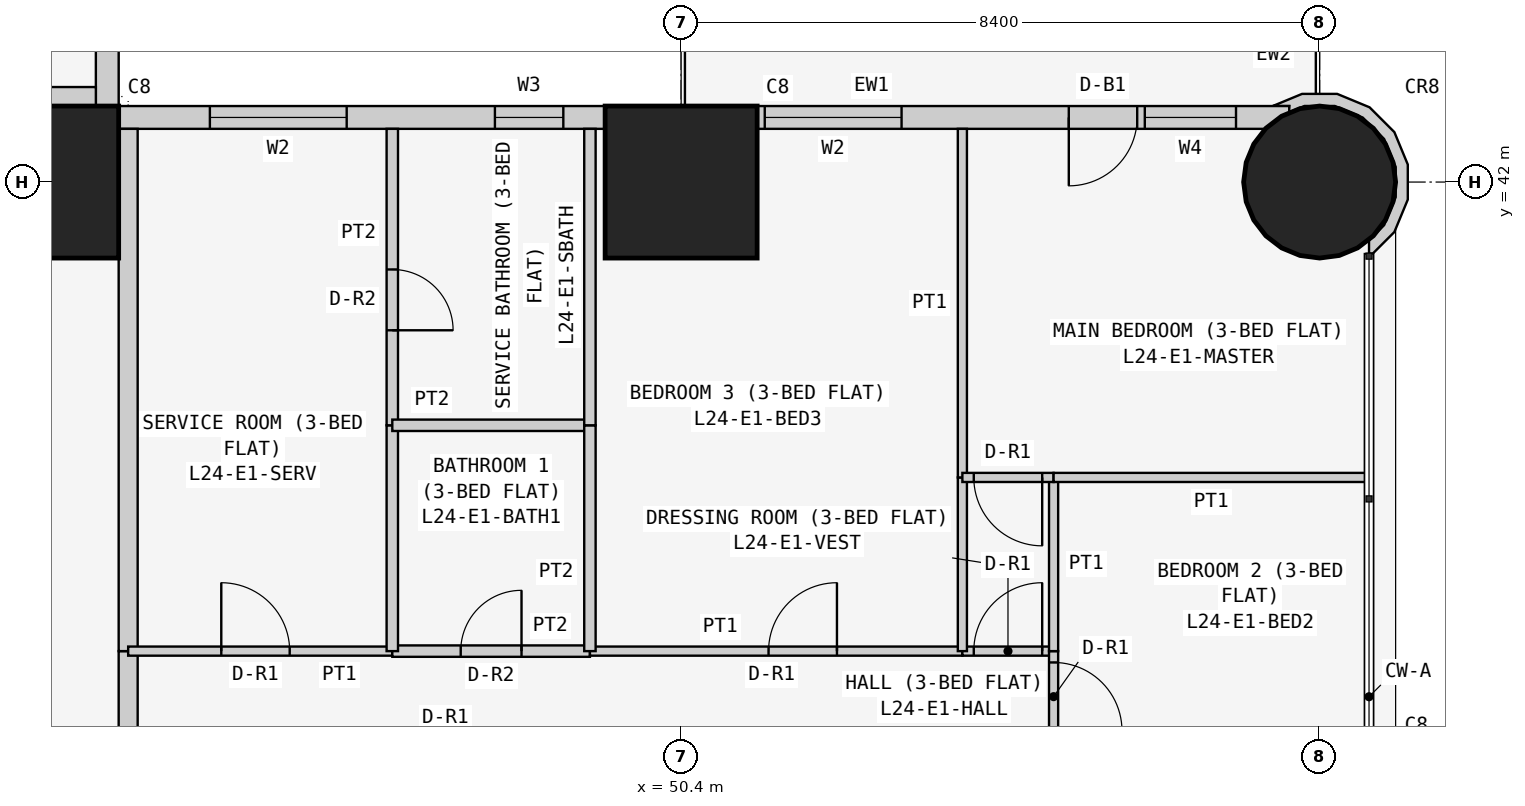
"""IFC4 building model, lengths in metres.
Left out: names, types, materials, properties, quantities, classifications, styles, units other than length and angle.
Written with IfcOpenShell. Run it as: python <this file> out.ifc"""

import sys

from ifc_helpers import new_model, si_unit, direction, frame, frame_2d, origin, origin_2d, place, context, subcontext, project, spatial, polyline, rectangle, circle, outline, extrude, element, fill, save


model = new_model("IFC4")
c1 = context("Model", 3, precision=1e-05, world=origin(), true_north=direction((0.0, 1.0)))
c2 = subcontext(c1, "Body", "Model", "MODEL_VIEW")
j1 = project(units=[si_unit("LENGTHUNIT", "METRE"), si_unit("PLANEANGLEUNIT", "RADIAN")], contexts=[c1])
p1 = place(None, origin())
s1 = spatial("IfcSite", under=j1, at=p1, CompositionType="ELEMENT")
p2 = place(p1, origin())
s2 = spatial("IfcBuilding", under=s1, at=p2, CompositionType="ELEMENT")
p3 = place(p2, frame((0.0, 0.0, 95.7)))
s3 = spatial("IfcBuildingStorey", under=s2, at=p3, CompositionType="ELEMENT", Elevation=95.7)
for number, where, z_axis, x_axis in (
    (1, (42.0, 42.0, 0.0), (0.0, 0.0, 1.0), (1.0, 0.0, 0.0)),
    (2, (50.4, 42.0, 0.0), (0.0, 0.0, 1.0), (1.0, 0.0, 0.0)),
):
    element("IfcColumn", number, at=place(p3, frame(where, z_axis=z_axis, x_axis=x_axis)), inside=s3, PredefinedType="COLUMN", context=c2, shape_type="SweptSolid", body=[
        extrude(rectangle(XDim=2.0, YDim=2.0, at=origin_2d()), origin(), (0.0, 0.0, 1.0), 3.6),
    ])
p4 = place(p3, frame((58.8, 42.0, 0.0), z_axis=(0.0, 0.0, 1.0), x_axis=(1.0, 0.0, 0.0)))
e3 = element("IfcColumn", 3, at=p4, inside=s3, PredefinedType="COLUMN", context=c2, shape_type="SweptSolid", body=[
    extrude(circle(Radius=1.0, at=origin_2d()), origin(), (0.0, 0.0, 1.0), 3.6),
])
p5 = place(p3, frame((58.4, 42.85, 0.0), z_axis=(0.0, 0.0, 1.0), x_axis=(-1.0, 0.0, 0.0)))
e4 = element("IfcWall", 4, at=p5, inside=s3, PredefinedType="SOLIDWALL", context=c2, shape_type="SweptSolid", body=[
    extrude(rectangle(XDim=15.7, YDim=0.3, at=frame_2d((7.85, 0.0))), origin(), (0.0, 0.0, 1.0), 3.45),
])
p6 = place(p5, frame((12.4, 0.0, 0.9)))
e5 = element("IfcOpeningElement", 5, at=p6, cuts=e4, PredefinedType="OPENING", context=c2, shape_type="SweptSolid", body=[
    extrude(rectangle(XDim=1.8, YDim=1.5, at=frame_2d((0.9, 0.75))), frame((0.0, 0.16, 0.0), z_axis=(0.0, -1.0, 0.0), x_axis=(1.0, 0.0, 0.0)), (0.0, 0.0, 1.0), 0.32),
])
p7 = place(p5, frame((9.55, 0.0, 1.5)))
e6 = element("IfcOpeningElement", 6, at=p7, cuts=e4, PredefinedType="OPENING", context=c2, shape_type="SweptSolid", body=[
    extrude(rectangle(XDim=0.9, YDim=0.7, at=frame_2d((0.45, 0.35))), frame((0.0, 0.16, 0.0), z_axis=(0.0, -1.0, 0.0), x_axis=(1.0, 0.0, 0.0)), (0.0, 0.0, 1.0), 0.32),
])
p8 = place(p5, frame((5.1, 0.0, 0.9)))
e7 = element("IfcOpeningElement", 7, at=p8, cuts=e4, PredefinedType="OPENING", context=c2, shape_type="SweptSolid", body=[
    extrude(rectangle(XDim=1.8, YDim=1.5, at=frame_2d((0.9, 0.75))), frame((0.0, 0.16, 0.0), z_axis=(0.0, -1.0, 0.0), x_axis=(1.0, 0.0, 0.0)), (0.0, 0.0, 1.0), 0.32),
])
p9 = place(p5, frame((2.0, 0.0, 0.0)))
e8 = element("IfcOpeningElement", 8, at=p9, cuts=e4, PredefinedType="OPENING", context=c2, shape_type="SweptSolid", body=[
    extrude(rectangle(XDim=0.9, YDim=2.4, at=frame_2d((0.45, 1.2))), frame((0.0, 0.16, 0.0), z_axis=(0.0, -1.0, 0.0), x_axis=(1.0, 0.0, 0.0)), (0.0, 0.0, 1.0), 0.32),
])
p10 = place(p5, frame((0.7, 0.0, 0.9)))
e9 = element("IfcOpeningElement", 9, at=p10, cuts=e4, PredefinedType="OPENING", context=c2, shape_type="SweptSolid", body=[
    extrude(rectangle(XDim=1.2, YDim=1.5, at=frame_2d((0.6, 0.75))), frame((0.0, 0.16, 0.0), z_axis=(0.0, -1.0, 0.0), x_axis=(1.0, 0.0, 0.0)), (0.0, 0.0, 1.0), 0.32),
])
p11 = place(p3, frame((42.85, 43.0, 0.0), z_axis=(0.0, 0.0, 1.0), x_axis=(0.0, 1.0, 0.0)))
e10 = element("IfcWall", 10, at=p11, inside=s3, PredefinedType="SOLIDWALL", context=c2, shape_type="SweptSolid", body=[
    extrude(rectangle(XDim=15.4, YDim=0.3, at=frame_2d((7.7, 0.0))), origin(), (0.0, 0.0, 1.0), 3.45),
])
p12 = place(p11, frame((1.2, 0.0, 0.9)))
e11 = element("IfcOpeningElement", 11, at=p12, cuts=e10, PredefinedType="OPENING", context=c2, shape_type="SweptSolid", body=[
    extrude(rectangle(XDim=1.8, YDim=1.5, at=frame_2d((0.9, 0.75))), frame((0.0, 0.16, 0.0), z_axis=(0.0, -1.0, 0.0), x_axis=(1.0, 0.0, 0.0)), (0.0, 0.0, 1.0), 0.32),
])
p13 = place(p11, frame((4.95, 0.0, 1.5)))
e12 = element("IfcOpeningElement", 12, at=p13, cuts=e10, PredefinedType="OPENING", context=c2, shape_type="SweptSolid", body=[
    extrude(rectangle(XDim=0.9, YDim=0.7, at=frame_2d((0.45, 0.35))), frame((0.0, 0.16, 0.0), z_axis=(0.0, -1.0, 0.0), x_axis=(1.0, 0.0, 0.0)), (0.0, 0.0, 1.0), 0.32),
])
p14 = place(p11, frame((8.5, 0.0, 0.9)))
e13 = element("IfcOpeningElement", 13, at=p14, cuts=e10, PredefinedType="OPENING", context=c2, shape_type="SweptSolid", body=[
    extrude(rectangle(XDim=1.8, YDim=1.5, at=frame_2d((0.9, 0.75))), frame((0.0, 0.16, 0.0), z_axis=(0.0, -1.0, 0.0), x_axis=(1.0, 0.0, 0.0)), (0.0, 0.0, 1.0), 0.32),
])
p15 = place(p11, frame((12.5, 0.0, 0.0)))
e14 = element("IfcOpeningElement", 14, at=p15, cuts=e10, PredefinedType="OPENING", context=c2, shape_type="SweptSolid", body=[
    extrude(rectangle(XDim=0.9, YDim=2.4, at=frame_2d((0.45, 1.2))), frame((0.0, 0.16, 0.0), z_axis=(0.0, -1.0, 0.0), x_axis=(1.0, 0.0, 0.0)), (0.0, 0.0, 1.0), 0.32),
])
p16 = place(p11, frame((13.5, 0.0, 0.9)))
e15 = element("IfcOpeningElement", 15, at=p16, cuts=e10, PredefinedType="OPENING", context=c2, shape_type="SweptSolid", body=[
    extrude(rectangle(XDim=1.2, YDim=1.5, at=frame_2d((0.6, 0.75))), frame((0.0, 0.16, 0.0), z_axis=(0.0, -1.0, 0.0), x_axis=(1.0, 0.0, 0.0)), (0.0, 0.0, 1.0), 0.32),
])
p17 = place(p3, frame((59.443, 41.132, 0.0), z_axis=(0.0, 0.0, 1.0), x_axis=(0.831199417842, 0.555974394895, 0.0)))
e16 = element("IfcWall", 16, at=p17, inside=s3, PredefinedType="SOLIDWALL", context=c2, shape_type="SweptSolid", body=[
    extrude(outline(polyline([(0.784, 0.242), (1.04, 0.626), (1.13, 1.078), (1.04, 1.531), (0.784, 1.915), (0.401, 2.171), (-0.009, 2.253), (0.171, 2.132), (0.113, 2.066), (0.339, 2.021), (0.67, 1.8), (0.891, 1.469), (0.968, 1.078), (0.89, 0.688), (0.669, 0.357), (0.338, 0.136), (0.062, 0.081), (-0.036, -0.066), (0.005, -0.093), (0.4, -0.014), (0.784, 0.242)])), origin(), (0.0, 0.0, 1.0), 3.45),
])
p18 = place(p3, frame((36.229, 43.125, 0.0), z_axis=(0.0, 0.0, 1.0), x_axis=(1.0, 0.0, 0.0)))
e17 = element("IfcWall", 17, at=p18, inside=s3, PredefinedType="PARTITIONING", context=c2, shape_type="SweptSolid", body=[
    extrude(rectangle(XDim=6.471, YDim=0.25, at=frame_2d((3.235, 0.0))), origin(), (0.0, 0.0, 1.0), 3.45),
])
p19 = place(p3, frame((43.125, 35.829, 0.0), z_axis=(0.0, 0.0, 1.0), x_axis=(0.0, -1.0, 0.0)))
e18 = element("IfcWall", 18, at=p19, inside=s3, PredefinedType="PARTITIONING", context=c2, shape_type="SweptSolid", body=[
    extrude(rectangle(XDim=1.2, YDim=0.25, at=frame_2d((0.6, 0.0))), origin(), (0.0, 0.0, 1.0), 3.45),
])
p20 = place(p3, frame((43.125, 42.7, 0.0), z_axis=(0.0, 0.0, 1.0), x_axis=(0.0, -1.0, 0.0)))
e19 = element("IfcWall", 19, at=p20, inside=s3, PredefinedType="PARTITIONING", context=c2, shape_type="SweptSolid", body=[
    extrude(rectangle(XDim=6.871, YDim=0.25, at=frame_2d((3.436, 0.0))), origin(), (0.0, 0.0, 1.0), 3.45),
])
p21 = place(p3, frame((46.6, 35.829, 0.0), z_axis=(0.0, 0.0, 1.0), x_axis=(-1.0, 0.0, 0.0)))
e20 = element("IfcWall", 20, at=p21, inside=s3, PredefinedType="PARTITIONING", context=c2, shape_type="SweptSolid", body=[
    extrude(rectangle(XDim=3.475, YDim=0.12, at=frame_2d((1.738, 0.0))), origin(), (0.0, 0.0, 1.0), 3.45),
])
p22 = place(p21, frame((1.35, 0.0, 0.0)))
e21 = element("IfcOpeningElement", 21, at=p22, cuts=e20, PredefinedType="OPENING", context=c2, shape_type="SweptSolid", body=[
    extrude(rectangle(XDim=0.9, YDim=2.1, at=frame_2d((0.45, 1.05))), frame((0.0, 0.07, 0.0), z_axis=(0.0, -1.0, 0.0), x_axis=(1.0, 0.0, 0.0)), (0.0, 0.0, 1.0), 0.14),
])
p23 = place(p3, frame((49.2, 35.829, 0.0), z_axis=(0.0, 0.0, 1.0), x_axis=(-1.0, 0.0, 0.0)))
e22 = element("IfcWall", 22, at=p23, inside=s3, PredefinedType="PARTITIONING", context=c2, shape_type="SweptSolid", body=[
    extrude(rectangle(XDim=2.6, YDim=0.15, at=frame_2d((1.3, 0.0))), origin(), (0.0, 0.0, 1.0), 3.45),
])
p24 = place(p23, frame((0.9, 0.0, 0.0)))
e23 = element("IfcOpeningElement", 23, at=p24, cuts=e22, PredefinedType="OPENING", context=c2, shape_type="SweptSolid", body=[
    extrude(rectangle(XDim=0.8, YDim=2.1, at=frame_2d((0.4, 1.05))), frame((0.0, 0.085, 0.0), z_axis=(0.0, -1.0, 0.0), x_axis=(1.0, 0.0, 0.0)), (0.0, 0.0, 1.0), 0.17),
])
p25 = place(p3, frame((54.1, 35.829, 0.0), z_axis=(0.0, 0.0, 1.0), x_axis=(-1.0, 0.0, 0.0)))
e24 = element("IfcWall", 24, at=p25, inside=s3, PredefinedType="PARTITIONING", context=c2, shape_type="SweptSolid", body=[
    extrude(rectangle(XDim=4.9, YDim=0.12, at=frame_2d((2.45, 0.0))), origin(), (0.0, 0.0, 1.0), 3.45),
])
p26 = place(p25, frame((1.65, 0.0, 0.0)))
e25 = element("IfcOpeningElement", 25, at=p26, cuts=e24, PredefinedType="OPENING", context=c2, shape_type="SweptSolid", body=[
    extrude(rectangle(XDim=0.9, YDim=2.1, at=frame_2d((0.45, 1.05))), frame((0.0, 0.07, 0.0), z_axis=(0.0, -1.0, 0.0), x_axis=(1.0, 0.0, 0.0)), (0.0, 0.0, 1.0), 0.14),
])
p27 = place(p3, frame((55.3, 35.829, 0.0), z_axis=(0.0, 0.0, 1.0), x_axis=(-1.0, 0.0, 0.0)))
e26 = element("IfcWall", 26, at=p27, inside=s3, PredefinedType="PARTITIONING", context=c2, shape_type="SweptSolid", body=[
    extrude(rectangle(XDim=1.2, YDim=0.12, at=frame_2d((0.6, 0.0))), origin(), (0.0, 0.0, 1.0), 3.45),
])
p28 = place(p27, frame((0.15, 0.0, 0.0)))
e27 = element("IfcOpeningElement", 27, at=p28, cuts=e26, PredefinedType="OPENING", context=c2, shape_type="SweptSolid", body=[
    extrude(rectangle(XDim=0.9, YDim=2.1, at=frame_2d((0.45, 1.05))), frame((0.0, 0.07, 0.0), z_axis=(0.0, -1.0, 0.0), x_axis=(1.0, 0.0, 0.0)), (0.0, 0.0, 1.0), 0.14),
])
p29 = place(p3, frame((55.3, 34.629, 0.0), z_axis=(0.0, 0.0, 1.0), x_axis=(0.0, 1.0, 0.0)))
e28 = element("IfcWall", 28, at=p29, inside=s3, PredefinedType="PARTITIONING", context=c2, shape_type="SweptSolid", body=[
    extrude(rectangle(XDim=1.2, YDim=0.12, at=frame_2d((0.6, 0.0))), origin(), (0.0, 0.0, 1.0), 3.45),
])
p30 = place(p29, frame((0.151, 0.0, 0.0)))
e29 = element("IfcOpeningElement", 29, at=p30, cuts=e28, PredefinedType="OPENING", context=c2, shape_type="SweptSolid", body=[
    extrude(rectangle(XDim=0.9, YDim=2.1, at=frame_2d((0.45, 1.05))), frame((0.0, 0.07, 0.0), z_axis=(0.0, -1.0, 0.0), x_axis=(1.0, 0.0, 0.0)), (0.0, 0.0, 1.0), 0.14),
])
p31 = place(p3, frame((46.6, 35.829, 0.0), z_axis=(0.0, 0.0, 1.0), x_axis=(0.0, 1.0, 0.0)))
e30 = element("IfcWall", 30, at=p31, inside=s3, PredefinedType="PARTITIONING", context=c2, shape_type="SweptSolid", body=[
    extrude(rectangle(XDim=2.971, YDim=0.15, at=frame_2d((1.485, 0.0))), origin(), (0.0, 0.0, 1.0), 3.45),
])
p32 = place(p3, frame((46.6, 38.8, 0.0), z_axis=(0.0, 0.0, 1.0), x_axis=(0.0, 1.0, 0.0)))
e31 = element("IfcWall", 31, at=p32, inside=s3, PredefinedType="PARTITIONING", context=c2, shape_type="SweptSolid", body=[
    extrude(rectangle(XDim=3.9, YDim=0.15, at=frame_2d((1.95, 0.0))), origin(), (0.0, 0.0, 1.0), 3.45),
])
p33 = place(p32, frame((1.25, 0.0, 0.0)))
e32 = element("IfcOpeningElement", 32, at=p33, cuts=e31, PredefinedType="OPENING", context=c2, shape_type="SweptSolid", body=[
    extrude(rectangle(XDim=0.8, YDim=2.1, at=frame_2d((0.4, 1.05))), frame((0.0, 0.085, 0.0), z_axis=(0.0, -1.0, 0.0), x_axis=(1.0, 0.0, 0.0)), (0.0, 0.0, 1.0), 0.17),
])
p34 = place(p3, frame((49.2, 38.8, 0.0), z_axis=(0.0, 0.0, 1.0), x_axis=(-1.0, 0.0, 0.0)))
e33 = element("IfcWall", 33, at=p34, inside=s3, PredefinedType="PARTITIONING", context=c2, shape_type="SweptSolid", body=[
    extrude(rectangle(XDim=2.6, YDim=0.15, at=frame_2d((1.3, 0.0))), origin(), (0.0, 0.0, 1.0), 3.45),
])
p35 = place(p3, frame((49.2, 35.829, 0.0), z_axis=(0.0, 0.0, 1.0), x_axis=(0.0, 1.0, 0.0)))
e34 = element("IfcWall", 34, at=p35, inside=s3, PredefinedType="PARTITIONING", context=c2, shape_type="SweptSolid", body=[
    extrude(rectangle(XDim=2.971, YDim=0.15, at=frame_2d((1.485, 0.0))), origin(), (0.0, 0.0, 1.0), 3.45),
])
p36 = place(p3, frame((49.2, 38.8, 0.0), z_axis=(0.0, 0.0, 1.0), x_axis=(0.0, 1.0, 0.0)))
e35 = element("IfcWall", 35, at=p36, inside=s3, PredefinedType="PARTITIONING", context=c2, shape_type="SweptSolid", body=[
    extrude(rectangle(XDim=3.9, YDim=0.15, at=frame_2d((1.95, 0.0))), origin(), (0.0, 0.0, 1.0), 3.45),
])
p37 = place(p3, frame((54.1, 35.829, 0.0), z_axis=(0.0, 0.0, 1.0), x_axis=(0.0, 1.0, 0.0)))
e36 = element("IfcWall", 36, at=p37, inside=s3, PredefinedType="PARTITIONING", context=c2, shape_type="SweptSolid", body=[
    extrude(rectangle(XDim=2.285, YDim=0.12, at=frame_2d((1.143, 0.0))), origin(), (0.0, 0.0, 1.0), 3.45),
])
p38 = place(p3, frame((54.1, 38.114, 0.0), z_axis=(0.0, 0.0, 1.0), x_axis=(0.0, 1.0, 0.0)))
e37 = element("IfcWall", 37, at=p38, inside=s3, PredefinedType="PARTITIONING", context=c2, shape_type="SweptSolid", body=[
    extrude(rectangle(XDim=4.586, YDim=0.12, at=frame_2d((2.293, 0.0))), origin(), (0.0, 0.0, 1.0), 3.45),
])
p39 = place(p3, frame((55.3, 35.829, 0.0), z_axis=(0.0, 0.0, 1.0), x_axis=(0.0, 1.0, 0.0)))
e38 = element("IfcWall", 38, at=p39, inside=s3, PredefinedType="PARTITIONING", context=c2, shape_type="SweptSolid", body=[
    extrude(rectangle(XDim=2.285, YDim=0.12, at=frame_2d((1.143, 0.0))), origin(), (0.0, 0.0, 1.0), 3.45),
])
p40 = place(p3, frame((55.3, 38.114, 0.0), z_axis=(0.0, 0.0, 1.0), x_axis=(-1.0, 0.0, 0.0)))
e39 = element("IfcWall", 39, at=p40, inside=s3, PredefinedType="PARTITIONING", context=c2, shape_type="SweptSolid", body=[
    extrude(rectangle(XDim=1.2, YDim=0.12, at=frame_2d((0.6, 0.0))), origin(), (0.0, 0.0, 1.0), 3.45),
])
p41 = place(p40, frame((0.15, 0.0, 0.0)))
e40 = element("IfcOpeningElement", 40, at=p41, cuts=e39, PredefinedType="OPENING", context=c2, shape_type="SweptSolid", body=[
    extrude(rectangle(XDim=0.9, YDim=2.1, at=frame_2d((0.45, 1.05))), frame((0.0, 0.07, 0.0), z_axis=(0.0, -1.0, 0.0), x_axis=(1.0, 0.0, 0.0)), (0.0, 0.0, 1.0), 0.14),
])
p42 = place(p3, frame((59.45, 38.114, 0.0), z_axis=(0.0, 0.0, 1.0), x_axis=(-1.0, 0.0, 0.0)))
e41 = element("IfcWall", 41, at=p42, inside=s3, PredefinedType="PARTITIONING", context=c2, shape_type="SweptSolid", body=[
    extrude(rectangle(XDim=4.15, YDim=0.12, at=frame_2d((2.075, 0.0))), origin(), (0.0, 0.0, 1.0), 3.45),
])
p43 = place(p6, origin())
e42 = element("IfcWindow", 42, at=p43, inside=s3, PartitioningType="SINGLE_PANEL", PredefinedType="WINDOW", context=c2, shape_type="SweptSolid", body=[
    extrude(rectangle(XDim=1.8, YDim=1.5, at=frame_2d((0.9, 0.75))), frame((0.0, 0.03, 0.0), z_axis=(0.0, -1.0, 0.0), x_axis=(1.0, 0.0, 0.0)), (0.0, 0.0, 1.0), 0.06),
])
fill(e5, e42)
p44 = place(p7, origin())
e43 = element("IfcWindow", 43, at=p44, inside=s3, PartitioningType="SINGLE_PANEL", PredefinedType="WINDOW", context=c2, shape_type="SweptSolid", body=[
    extrude(rectangle(XDim=0.9, YDim=0.7, at=frame_2d((0.45, 0.35))), frame((0.0, 0.03, 0.0), z_axis=(0.0, -1.0, 0.0), x_axis=(1.0, 0.0, 0.0)), (0.0, 0.0, 1.0), 0.06),
])
fill(e6, e43)
p45 = place(p8, origin())
e44 = element("IfcWindow", 44, at=p45, inside=s3, PartitioningType="SINGLE_PANEL", PredefinedType="WINDOW", context=c2, shape_type="SweptSolid", body=[
    extrude(rectangle(XDim=1.8, YDim=1.5, at=frame_2d((0.9, 0.75))), frame((0.0, 0.03, 0.0), z_axis=(0.0, -1.0, 0.0), x_axis=(1.0, 0.0, 0.0)), (0.0, 0.0, 1.0), 0.06),
])
fill(e7, e44)
p46 = place(p9, origin())
e45 = element("IfcDoor", 45, at=p46, inside=s3, OperationType="SINGLE_SWING_RIGHT", PredefinedType="DOOR", context=c2, shape_type="SweptSolid", body=[
    extrude(rectangle(XDim=0.9, YDim=2.4, at=frame_2d((0.45, 1.2))), frame((0.0, 0.025, 0.0), z_axis=(0.0, -1.0, 0.0), x_axis=(1.0, 0.0, 0.0)), (0.0, 0.0, 1.0), 0.05),
])
fill(e8, e45)
p47 = place(p10, origin())
e46 = element("IfcWindow", 46, at=p47, inside=s3, PartitioningType="SINGLE_PANEL", PredefinedType="WINDOW", context=c2, shape_type="SweptSolid", body=[
    extrude(rectangle(XDim=1.2, YDim=1.5, at=frame_2d((0.6, 0.75))), frame((0.0, 0.03, 0.0), z_axis=(0.0, -1.0, 0.0), x_axis=(1.0, 0.0, 0.0)), (0.0, 0.0, 1.0), 0.06),
])
fill(e9, e46)
p48 = place(p22, frame((0.9, 0.0, 0.0), z_axis=(0.0, 0.0, 1.0), x_axis=(-1.0, 0.0, 0.0)))
e47 = element("IfcDoor", 47, at=p48, inside=s3, OperationType="SINGLE_SWING_LEFT", PredefinedType="DOOR", context=c2, shape_type="SweptSolid", body=[
    extrude(rectangle(XDim=0.9, YDim=2.1, at=frame_2d((0.45, 1.05))), frame((0.0, 0.025, 0.0), z_axis=(0.0, -1.0, 0.0), x_axis=(1.0, 0.0, 0.0)), (0.0, 0.0, 1.0), 0.05),
])
fill(e21, e47)
p49 = place(p33, frame((0.8, 0.0, 0.0), z_axis=(0.0, 0.0, 1.0), x_axis=(-1.0, 0.0, 0.0)))
e48 = element("IfcDoor", 48, at=p49, inside=s3, OperationType="SINGLE_SWING_RIGHT", PredefinedType="DOOR", context=c2, shape_type="SweptSolid", body=[
    extrude(rectangle(XDim=0.8, YDim=2.1, at=frame_2d((0.4, 1.05))), frame((0.0, 0.025, 0.0), z_axis=(0.0, -1.0, 0.0), x_axis=(1.0, 0.0, 0.0)), (0.0, 0.0, 1.0), 0.05),
])
fill(e32, e48)
p50 = place(p24, frame((0.8, 0.0, 0.0), z_axis=(0.0, 0.0, 1.0), x_axis=(-1.0, 0.0, 0.0)))
e49 = element("IfcDoor", 49, at=p50, inside=s3, OperationType="SINGLE_SWING_RIGHT", PredefinedType="DOOR", context=c2, shape_type="SweptSolid", body=[
    extrude(rectangle(XDim=0.8, YDim=2.1, at=frame_2d((0.4, 1.05))), frame((0.0, 0.025, 0.0), z_axis=(0.0, -1.0, 0.0), x_axis=(1.0, 0.0, 0.0)), (0.0, 0.0, 1.0), 0.05),
])
fill(e23, e49)
p51 = place(p26, frame((0.9, 0.0, 0.0), z_axis=(0.0, 0.0, 1.0), x_axis=(-1.0, 0.0, 0.0)))
e50 = element("IfcDoor", 50, at=p51, inside=s3, OperationType="SINGLE_SWING_RIGHT", PredefinedType="DOOR", context=c2, shape_type="SweptSolid", body=[
    extrude(rectangle(XDim=0.9, YDim=2.1, at=frame_2d((0.45, 1.05))), frame((0.0, 0.025, 0.0), z_axis=(0.0, -1.0, 0.0), x_axis=(1.0, 0.0, 0.0)), (0.0, 0.0, 1.0), 0.05),
])
fill(e25, e50)
p52 = place(p28, frame((0.9, 0.0, 0.0), z_axis=(0.0, 0.0, 1.0), x_axis=(-1.0, 0.0, 0.0)))
e51 = element("IfcDoor", 51, at=p52, inside=s3, OperationType="SINGLE_SWING_RIGHT", PredefinedType="DOOR", context=c2, shape_type="SweptSolid", body=[
    extrude(rectangle(XDim=0.9, YDim=2.1, at=frame_2d((0.45, 1.05))), frame((0.0, 0.025, 0.0), z_axis=(0.0, -1.0, 0.0), x_axis=(1.0, 0.0, 0.0)), (0.0, 0.0, 1.0), 0.05),
])
fill(e27, e51)
p53 = place(p41, origin())
e52 = element("IfcDoor", 52, at=p53, inside=s3, OperationType="SINGLE_SWING_LEFT", PredefinedType="DOOR", context=c2, shape_type="SweptSolid", body=[
    extrude(rectangle(XDim=0.9, YDim=2.1, at=frame_2d((0.45, 1.05))), frame((0.0, 0.025, 0.0), z_axis=(0.0, -1.0, 0.0), x_axis=(1.0, 0.0, 0.0)), (0.0, 0.0, 1.0), 0.05),
])
fill(e40, e52)
p54 = place(p30, frame((0.9, 0.0, 0.0), z_axis=(0.0, 0.0, 1.0), x_axis=(-1.0, 0.0, 0.0)))
e53 = element("IfcDoor", 53, at=p54, inside=s3, OperationType="SINGLE_SWING_RIGHT", PredefinedType="DOOR", context=c2, shape_type="SweptSolid", body=[
    extrude(rectangle(XDim=0.9, YDim=2.1, at=frame_2d((0.45, 1.05))), frame((0.0, 0.025, 0.0), z_axis=(0.0, -1.0, 0.0), x_axis=(1.0, 0.0, 0.0)), (0.0, 0.0, 1.0), 0.05),
])
fill(e29, e53)
save(model, sys.argv[1])
